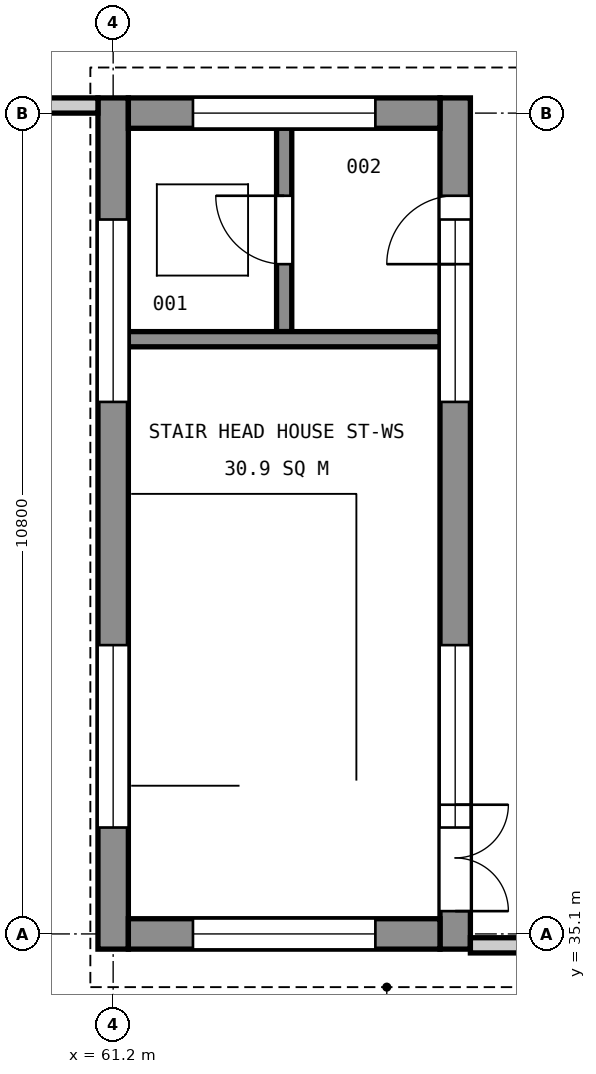
"""IFC4 building model, lengths in metres.
Left out: names, types, materials, properties, quantities, classifications, styles, units other than length and angle.
Written with IfcOpenShell. Run it as: python <this file> out.ifc"""

import sys

from ifc_helpers import new_model, si_unit, direction, frame, frame_2d, origin, place, context, subcontext, project, spatial, rectangle, extrude, element, fill, save


model = new_model("IFC4")
c1 = context("Model", 3, precision=1e-05, world=origin(), true_north=direction((0.0, 1.0)))
c2 = subcontext(c1, "Body", "Model", "MODEL_VIEW")
j1 = project(units=[si_unit("LENGTHUNIT", "METRE"), si_unit("PLANEANGLEUNIT", "RADIAN")], contexts=[c1])
p1 = place(None, origin())
s1 = spatial("IfcSite", under=j1, at=p1, CompositionType="ELEMENT")
p2 = place(p1, origin())
s2 = spatial("IfcBuilding", under=s1, at=p2, CompositionType="ELEMENT")
p3 = place(p2, frame((0.0, 0.0, 75.0)))
s3 = spatial("IfcBuildingStorey", under=s2, at=p3, CompositionType="ELEMENT", Elevation=75.0)
p4 = place(p3, frame((61.2, 34.9, 0.0), z_axis=(0.0, 0.0, 1.0), x_axis=(0.0, 1.0, 0.0)))
e1 = element("IfcWall", 1, at=p4, inside=s3, PredefinedType="SHEAR", context=c2, shape_type="SweptSolid", body=[
    extrude(rectangle(XDim=11.2, YDim=0.4, at=frame_2d((5.6, 0.0))), origin(), (0.0, 0.0, 1.0), 3.6),
])
p5 = place(p4, frame((1.6, 0.0, 2.2)))
e2 = element("IfcOpeningElement", 2, at=p5, cuts=e1, PredefinedType="OPENING", context=c2, shape_type="SweptSolid", body=[
    extrude(rectangle(XDim=2.4, YDim=1.2, at=frame_2d((1.2, 0.6))), frame((0.0, 0.21, 0.0), z_axis=(0.0, -1.0, 0.0), x_axis=(1.0, 0.0, 0.0)), (0.0, 0.0, 1.0), 0.42),
])
p6 = place(p4, frame((7.2, 0.0, 2.2)))
e3 = element("IfcOpeningElement", 3, at=p6, cuts=e1, PredefinedType="OPENING", context=c2, shape_type="SweptSolid", body=[
    extrude(rectangle(XDim=2.4, YDim=1.2, at=frame_2d((1.2, 0.6))), frame((0.0, 0.21, 0.0), z_axis=(0.0, -1.0, 0.0), x_axis=(1.0, 0.0, 0.0)), (0.0, 0.0, 1.0), 0.42),
])
p7 = place(p3, frame((65.7, 34.9, 0.0), z_axis=(0.0, 0.0, 1.0), x_axis=(0.0, 1.0, 0.0)))
e4 = element("IfcWall", 4, at=p7, inside=s3, PredefinedType="SHEAR", context=c2, shape_type="SweptSolid", body=[
    extrude(rectangle(XDim=11.2, YDim=0.4, at=frame_2d((5.6, 0.0))), origin(), (0.0, 0.0, 1.0), 3.6),
])
p8 = place(p7, frame((0.5, 0.0, 0.0)))
e5 = element("IfcOpeningElement", 5, at=p8, cuts=e4, PredefinedType="OPENING", context=c2, shape_type="SweptSolid", body=[
    extrude(rectangle(XDim=1.4, YDim=2.1, at=frame_2d((0.7, 1.05))), frame((0.0, 0.21, 0.0), z_axis=(0.0, -1.0, 0.0), x_axis=(1.0, 0.0, 0.0)), (0.0, 0.0, 1.0), 0.42),
])
p9 = place(p7, frame((1.6, 0.0, 2.2)))
e6 = element("IfcOpeningElement", 6, at=p9, cuts=e4, PredefinedType="OPENING", context=c2, shape_type="SweptSolid", body=[
    extrude(rectangle(XDim=2.4, YDim=1.2, at=frame_2d((1.2, 0.6))), frame((0.0, 0.21, 0.0), z_axis=(0.0, -1.0, 0.0), x_axis=(1.0, 0.0, 0.0)), (0.0, 0.0, 1.0), 0.42),
])
p10 = place(p7, frame((7.2, 0.0, 2.2)))
e7 = element("IfcOpeningElement", 7, at=p10, cuts=e4, PredefinedType="OPENING", context=c2, shape_type="SweptSolid", body=[
    extrude(rectangle(XDim=2.4, YDim=1.2, at=frame_2d((1.2, 0.6))), frame((0.0, 0.21, 0.0), z_axis=(0.0, -1.0, 0.0), x_axis=(1.0, 0.0, 0.0)), (0.0, 0.0, 1.0), 0.42),
])
p11 = place(p7, frame((9.012, 0.0, 0.0)))
e8 = element("IfcOpeningElement", 8, at=p11, cuts=e4, PredefinedType="OPENING", context=c2, shape_type="SweptSolid", body=[
    extrude(rectangle(XDim=0.9, YDim=2.1, at=frame_2d((0.45, 1.05))), frame((0.0, 0.21, 0.0), z_axis=(0.0, -1.0, 0.0), x_axis=(1.0, 0.0, 0.0)), (0.0, 0.0, 1.0), 0.42),
])
p12 = place(p3, frame((61.4, 35.1, 0.0), z_axis=(0.0, 0.0, 1.0), x_axis=(1.0, 0.0, 0.0)))
e9 = element("IfcWall", 9, at=p12, inside=s3, PredefinedType="SHEAR", context=c2, shape_type="SweptSolid", body=[
    extrude(rectangle(XDim=4.1, YDim=0.4, at=frame_2d((2.05, 0.0))), origin(), (0.0, 0.0, 1.0), 3.6),
])
p13 = place(p12, frame((0.85, 0.0, 2.2)))
e10 = element("IfcOpeningElement", 10, at=p13, cuts=e9, PredefinedType="OPENING", context=c2, shape_type="SweptSolid", body=[
    extrude(rectangle(XDim=2.4, YDim=1.2, at=frame_2d((1.2, 0.6))), frame((0.0, 0.21, 0.0), z_axis=(0.0, -1.0, 0.0), x_axis=(1.0, 0.0, 0.0)), (0.0, 0.0, 1.0), 0.42),
])
p14 = place(p3, frame((61.4, 45.9, 0.0), z_axis=(0.0, 0.0, 1.0), x_axis=(1.0, 0.0, 0.0)))
e11 = element("IfcWall", 11, at=p14, inside=s3, PredefinedType="SHEAR", context=c2, shape_type="SweptSolid", body=[
    extrude(rectangle(XDim=4.1, YDim=0.4, at=frame_2d((2.05, 0.0))), origin(), (0.0, 0.0, 1.0), 3.6),
])
p15 = place(p14, frame((0.85, 0.0, 2.2)))
e12 = element("IfcOpeningElement", 12, at=p15, cuts=e11, PredefinedType="OPENING", context=c2, shape_type="SweptSolid", body=[
    extrude(rectangle(XDim=2.4, YDim=1.2, at=frame_2d((1.2, 0.6))), frame((0.0, 0.21, 0.0), z_axis=(0.0, -1.0, 0.0), x_axis=(1.0, 0.0, 0.0)), (0.0, 0.0, 1.0), 0.42),
])
p16 = place(p3, frame((68.4, 34.95, 0.0), z_axis=(0.0, 0.0, 1.0), x_axis=(-1.0, 0.0, 0.0)))
e13 = element("IfcWall", 13, at=p16, inside=s3, PredefinedType="PARAPET", context=c2, shape_type="SweptSolid", body=[
    extrude(rectangle(XDim=2.5, YDim=0.2, at=frame_2d((1.25, 0.0))), origin(), (0.0, 0.0, 1.0), 1.2),
])
p17 = place(p3, frame((61.0, 46.0, 0.0), z_axis=(0.0, 0.0, 1.0), x_axis=(-1.0, 0.0, 0.0)))
e14 = element("IfcWall", 14, at=p17, inside=s3, PredefinedType="PARAPET", context=c2, shape_type="SweptSolid", body=[
    extrude(rectangle(XDim=3.4, YDim=0.2, at=frame_2d((1.7, 0.0))), origin(), (0.0, 0.0, 1.0), 1.2),
])
p18 = place(p3, frame((63.45, 43.025, 0.0), z_axis=(0.0, 0.0, 1.0), x_axis=(0.0, 1.0, 0.0)))
e15 = element("IfcWall", 15, at=p18, inside=s3, PredefinedType="SOLIDWALL", context=c2, shape_type="SweptSolid", body=[
    extrude(rectangle(XDim=2.675, YDim=0.2, at=frame_2d((1.337, 0.0))), origin(), (0.0, 0.0, 1.0), 3.6),
])
p19 = place(p18, frame((0.887, 0.0, 0.0)))
e16 = element("IfcOpeningElement", 16, at=p19, cuts=e15, PredefinedType="OPENING", context=c2, shape_type="SweptSolid", body=[
    extrude(rectangle(XDim=0.9, YDim=2.1, at=frame_2d((0.45, 1.05))), frame((0.0, 0.11, 0.0), z_axis=(0.0, -1.0, 0.0), x_axis=(1.0, 0.0, 0.0)), (0.0, 0.0, 1.0), 0.22),
])
p20 = place(p3, frame((61.4, 42.925, 0.0), z_axis=(0.0, 0.0, 1.0), x_axis=(1.0, 0.0, 0.0)))
e17 = element("IfcWall", 17, at=p20, inside=s3, PredefinedType="SOLIDWALL", context=c2, shape_type="SweptSolid", body=[
    extrude(rectangle(XDim=4.1, YDim=0.2, at=frame_2d((2.05, 0.0))), origin(), (0.0, 0.0, 1.0), 3.6),
])
p21 = place(p8, frame((1.4, 0.0, 0.0), z_axis=(0.0, 0.0, 1.0), x_axis=(-1.0, 0.0, 0.0)))
e18 = element("IfcDoor", 18, at=p21, inside=s3, OperationType="DOUBLE_DOOR_SINGLE_SWING", PredefinedType="DOOR", context=c2, shape_type="SweptSolid", body=[
    extrude(rectangle(XDim=1.4, YDim=2.1, at=frame_2d((0.7, 1.05))), frame((0.0, 0.025, 0.0), z_axis=(0.0, -1.0, 0.0), x_axis=(1.0, 0.0, 0.0)), (0.0, 0.0, 1.0), 0.05),
])
fill(e5, e18)
p22 = place(p5, origin())
e19 = element("IfcWindow", 19, at=p22, inside=s3, PartitioningType="SINGLE_PANEL", PredefinedType="USERDEFINED", context=c2, shape_type="SweptSolid", body=[
    extrude(rectangle(XDim=2.4, YDim=1.2, at=frame_2d((1.2, 0.6))), frame((0.0, 0.03, 0.0), z_axis=(0.0, -1.0, 0.0), x_axis=(1.0, 0.0, 0.0)), (0.0, 0.0, 1.0), 0.06),
])
fill(e2, e19)
p23 = place(p6, origin())
e20 = element("IfcWindow", 20, at=p23, inside=s3, PartitioningType="SINGLE_PANEL", PredefinedType="USERDEFINED", context=c2, shape_type="SweptSolid", body=[
    extrude(rectangle(XDim=2.4, YDim=1.2, at=frame_2d((1.2, 0.6))), frame((0.0, 0.03, 0.0), z_axis=(0.0, -1.0, 0.0), x_axis=(1.0, 0.0, 0.0)), (0.0, 0.0, 1.0), 0.06),
])
fill(e3, e20)
p24 = place(p9, origin())
e21 = element("IfcWindow", 21, at=p24, inside=s3, PartitioningType="SINGLE_PANEL", PredefinedType="USERDEFINED", context=c2, shape_type="SweptSolid", body=[
    extrude(rectangle(XDim=2.4, YDim=1.2, at=frame_2d((1.2, 0.6))), frame((0.0, 0.03, 0.0), z_axis=(0.0, -1.0, 0.0), x_axis=(1.0, 0.0, 0.0)), (0.0, 0.0, 1.0), 0.06),
])
fill(e6, e21)
p25 = place(p10, origin())
e22 = element("IfcWindow", 22, at=p25, inside=s3, PartitioningType="SINGLE_PANEL", PredefinedType="USERDEFINED", context=c2, shape_type="SweptSolid", body=[
    extrude(rectangle(XDim=2.4, YDim=1.2, at=frame_2d((1.2, 0.6))), frame((0.0, 0.03, 0.0), z_axis=(0.0, -1.0, 0.0), x_axis=(1.0, 0.0, 0.0)), (0.0, 0.0, 1.0), 0.06),
])
fill(e7, e22)
p26 = place(p13, origin())
e23 = element("IfcWindow", 23, at=p26, inside=s3, PartitioningType="SINGLE_PANEL", PredefinedType="USERDEFINED", context=c2, shape_type="SweptSolid", body=[
    extrude(rectangle(XDim=2.4, YDim=1.2, at=frame_2d((1.2, 0.6))), frame((0.0, 0.03, 0.0), z_axis=(0.0, -1.0, 0.0), x_axis=(1.0, 0.0, 0.0)), (0.0, 0.0, 1.0), 0.06),
])
fill(e10, e23)
p27 = place(p15, origin())
e24 = element("IfcWindow", 24, at=p27, inside=s3, PartitioningType="SINGLE_PANEL", PredefinedType="USERDEFINED", context=c2, shape_type="SweptSolid", body=[
    extrude(rectangle(XDim=2.4, YDim=1.2, at=frame_2d((1.2, 0.6))), frame((0.0, 0.03, 0.0), z_axis=(0.0, -1.0, 0.0), x_axis=(1.0, 0.0, 0.0)), (0.0, 0.0, 1.0), 0.06),
])
fill(e12, e24)
p28 = place(p11, origin())
e25 = element("IfcDoor", 25, at=p28, inside=s3, OperationType="SINGLE_SWING_LEFT", PredefinedType="DOOR", context=c2, shape_type="SweptSolid", body=[
    extrude(rectangle(XDim=0.9, YDim=2.1, at=frame_2d((0.45, 1.05))), frame((0.0, 0.025, 0.0), z_axis=(0.0, -1.0, 0.0), x_axis=(1.0, 0.0, 0.0)), (0.0, 0.0, 1.0), 0.05),
])
fill(e8, e25)
p29 = place(p19, origin())
e26 = element("IfcDoor", 26, at=p29, inside=s3, OperationType="SINGLE_SWING_RIGHT", PredefinedType="DOOR", context=c2, shape_type="SweptSolid", body=[
    extrude(rectangle(XDim=0.9, YDim=2.1, at=frame_2d((0.45, 1.05))), frame((0.0, 0.025, 0.0), z_axis=(0.0, -1.0, 0.0), x_axis=(1.0, 0.0, 0.0)), (0.0, 0.0, 1.0), 0.05),
])
fill(e16, e26)
save(model, sys.argv[1])
